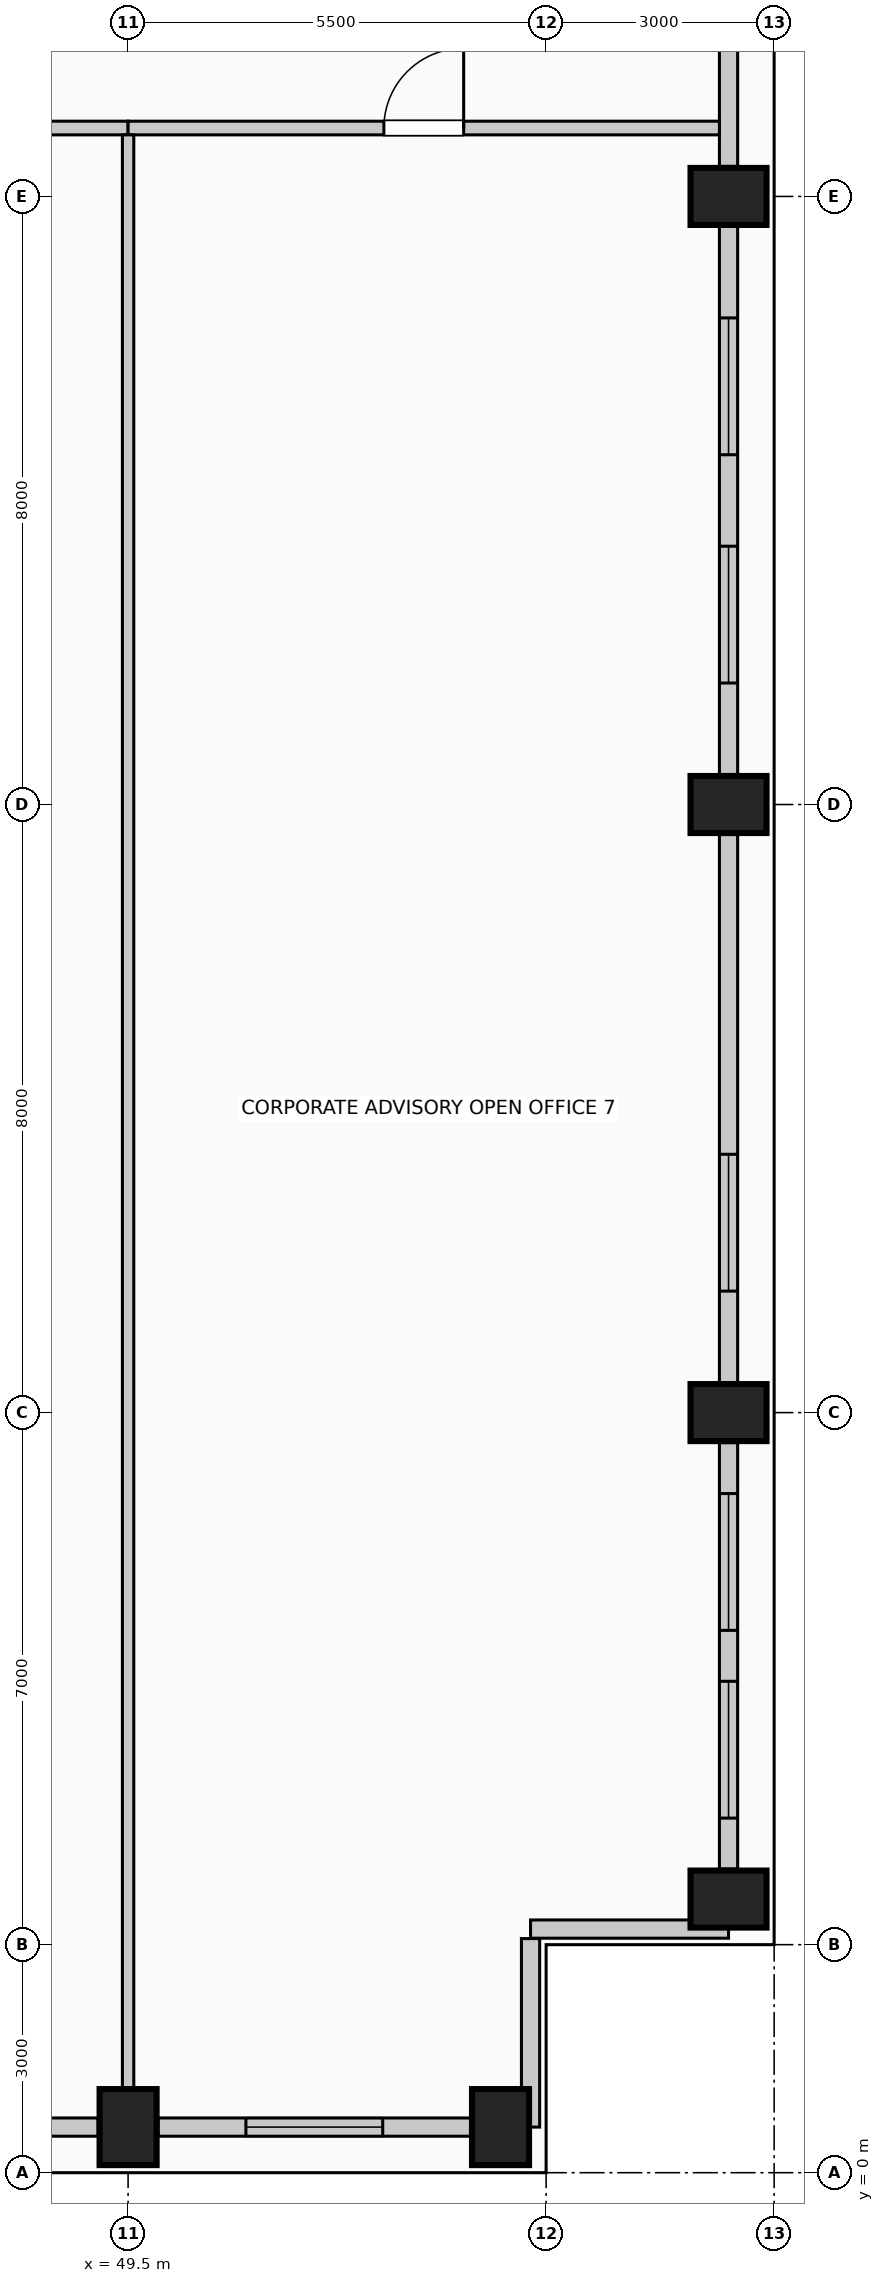
"""IFC4 building model, lengths in metres.
Left out: names, types, materials, properties, quantities, classifications, styles, units other than length and angle.
Written with IfcOpenShell. Run it as: python <this file> out.ifc"""

import sys

from ifc_helpers import new_model, si_unit, direction, frame, frame_2d, origin, origin_2d, place, context, subcontext, project, spatial, rectangle, extrude, element, fill, save


model = new_model("IFC4")
c1 = context("Model", 3, precision=1e-05, world=origin(), true_north=direction((0.0, 1.0)))
c2 = subcontext(c1, "Body", "Model", "MODEL_VIEW")
j1 = project(units=[si_unit("LENGTHUNIT", "METRE"), si_unit("PLANEANGLEUNIT", "RADIAN")], contexts=[c1])
p1 = place(None, origin())
s1 = spatial("IfcSite", under=j1, at=p1, CompositionType="ELEMENT")
p2 = place(p1, origin())
s2 = spatial("IfcBuilding", under=s1, at=p2, CompositionType="ELEMENT")
p3 = place(p2, frame((0.0, 0.0, 264.6)))
s3 = spatial("IfcBuildingStorey", under=s2, at=p3, CompositionType="ELEMENT", Elevation=264.6)
for number, where, z_axis, x_axis in (
    (1, (49.5, 0.6, 0.0), (0.0, 0.0, 1.0), (1.0, 0.0, 0.0)),
    (2, (54.4, 0.6, 0.0), (0.0, 0.0, 1.0), (1.0, 0.0, 0.0)),
    (3, (57.4, 3.6, 0.0), (0.0, 0.0, 1.0), (0.0, 1.0, 0.0)),
    (4, (57.4, 10.0, 0.0), (0.0, 0.0, 1.0), (0.0, 1.0, 0.0)),
    (5, (57.4, 18.0, 0.0), (0.0, 0.0, 1.0), (0.0, 1.0, 0.0)),
    (6, (57.4, 26.0, 0.0), (0.0, 0.0, 1.0), (0.0, 1.0, 0.0)),
):
    element("IfcColumn", number, at=place(p3, frame(where, z_axis=z_axis, x_axis=x_axis)), inside=s3, PredefinedType="COLUMN", context=c2, shape_type="SweptSolid", body=[
        extrude(rectangle(XDim=0.75, YDim=1.0, at=origin_2d()), origin(), (0.0, 0.0, 1.0), 4.0),
    ])
p4 = place(p3, frame((49.105, 0.6, 0.0), z_axis=(0.0, 0.0, 1.0), x_axis=(-1.0, 0.0, 0.0)))
e7 = element("IfcWall", 7, at=p4, inside=s3, PredefinedType="SOLIDWALL", context=c2, shape_type="SweptSolid", body=[
    extrude(rectangle(XDim=4.71, YDim=0.24, at=frame_2d((2.355, 0.0))), origin(), (0.0, 0.0, 1.0), 3.0),
])
p5 = place(p3, frame((54.005, 0.6, 0.0), z_axis=(0.0, 0.0, 1.0), x_axis=(-1.0, 0.0, 0.0)))
e8 = element("IfcWall", 8, at=p5, inside=s3, PredefinedType="SOLIDWALL", context=c2, shape_type="SweptSolid", body=[
    extrude(rectangle(XDim=4.11, YDim=0.24, at=frame_2d((2.055, 0.0))), origin(), (0.0, 0.0, 1.0), 3.0),
])
p6 = place(p5, frame((1.155, 0.0, 0.42)))
e9 = element("IfcOpeningElement", 9, at=p6, cuts=e8, PredefinedType="OPENING", context=c2, shape_type="SweptSolid", body=[
    extrude(rectangle(XDim=1.8, YDim=2.2, at=frame_2d((0.9, 1.1))), frame((0.0, 0.13, 0.0), z_axis=(0.0, -1.0, 0.0), x_axis=(1.0, 0.0, 0.0)), (0.0, 0.0, 1.0), 0.26),
])
p7 = place(p3, frame((57.4, 9.605, 0.0), z_axis=(0.0, 0.0, 1.0), x_axis=(0.0, -1.0, 0.0)))
e10 = element("IfcWall", 10, at=p7, inside=s3, PredefinedType="SOLIDWALL", context=c2, shape_type="SweptSolid", body=[
    extrude(rectangle(XDim=5.61, YDim=0.24, at=frame_2d((2.805, 0.0))), origin(), (0.0, 0.0, 1.0), 3.0),
])
p8 = place(p7, frame((0.67, 0.0, 0.42)))
e11 = element("IfcOpeningElement", 11, at=p8, cuts=e10, PredefinedType="OPENING", context=c2, shape_type="SweptSolid", body=[
    extrude(rectangle(XDim=1.8, YDim=2.2, at=frame_2d((0.9, 1.1))), frame((0.0, 0.13, 0.0), z_axis=(0.0, -1.0, 0.0), x_axis=(1.0, 0.0, 0.0)), (0.0, 0.0, 1.0), 0.26),
])
p9 = place(p7, frame((3.14, 0.0, 0.42)))
e12 = element("IfcOpeningElement", 12, at=p9, cuts=e10, PredefinedType="OPENING", context=c2, shape_type="SweptSolid", body=[
    extrude(rectangle(XDim=1.8, YDim=2.2, at=frame_2d((0.9, 1.1))), frame((0.0, 0.13, 0.0), z_axis=(0.0, -1.0, 0.0), x_axis=(1.0, 0.0, 0.0)), (0.0, 0.0, 1.0), 0.26),
])
p10 = place(p3, frame((57.4, 17.605, 0.0), z_axis=(0.0, 0.0, 1.0), x_axis=(0.0, -1.0, 0.0)))
e13 = element("IfcWall", 13, at=p10, inside=s3, PredefinedType="SOLIDWALL", context=c2, shape_type="SweptSolid", body=[
    extrude(rectangle(XDim=7.21, YDim=0.24, at=frame_2d((3.605, 0.0))), origin(), (0.0, 0.0, 1.0), 3.0),
])
p11 = place(p10, frame((4.207, 0.0, 0.42)))
e14 = element("IfcOpeningElement", 14, at=p11, cuts=e13, PredefinedType="OPENING", context=c2, shape_type="SweptSolid", body=[
    extrude(rectangle(XDim=1.8, YDim=2.2, at=frame_2d((0.9, 1.1))), frame((0.0, 0.13, 0.0), z_axis=(0.0, -1.0, 0.0), x_axis=(1.0, 0.0, 0.0)), (0.0, 0.0, 1.0), 0.26),
])
p12 = place(p3, frame((57.4, 25.605, 0.0), z_axis=(0.0, 0.0, 1.0), x_axis=(0.0, -1.0, 0.0)))
e15 = element("IfcWall", 15, at=p12, inside=s3, PredefinedType="SOLIDWALL", context=c2, shape_type="SweptSolid", body=[
    extrude(rectangle(XDim=7.21, YDim=0.24, at=frame_2d((3.605, 0.0))), origin(), (0.0, 0.0, 1.0), 3.0),
])
p13 = place(p12, frame((1.203, 0.0, 0.42)))
e16 = element("IfcOpeningElement", 16, at=p13, cuts=e15, PredefinedType="OPENING", context=c2, shape_type="SweptSolid", body=[
    extrude(rectangle(XDim=1.8, YDim=2.2, at=frame_2d((0.9, 1.1))), frame((0.0, 0.13, 0.0), z_axis=(0.0, -1.0, 0.0), x_axis=(1.0, 0.0, 0.0)), (0.0, 0.0, 1.0), 0.26),
])
p14 = place(p12, frame((4.207, 0.0, 0.42)))
e17 = element("IfcOpeningElement", 17, at=p14, cuts=e15, PredefinedType="OPENING", context=c2, shape_type="SweptSolid", body=[
    extrude(rectangle(XDim=1.8, YDim=2.2, at=frame_2d((0.9, 1.1))), frame((0.0, 0.13, 0.0), z_axis=(0.0, -1.0, 0.0), x_axis=(1.0, 0.0, 0.0)), (0.0, 0.0, 1.0), 0.26),
])
p15 = place(p3, frame((57.4, 33.605, 0.0), z_axis=(0.0, 0.0, 1.0), x_axis=(0.0, -1.0, 0.0)))
e18 = element("IfcWall", 18, at=p15, inside=s3, PredefinedType="SOLIDWALL", context=c2, shape_type="SweptSolid", body=[
    extrude(rectangle(XDim=7.21, YDim=0.24, at=frame_2d((3.605, 0.0))), origin(), (0.0, 0.0, 1.0), 3.0),
])
p16 = place(p3, frame((57.4, 3.205, 0.0), z_axis=(0.0, 0.0, 1.0), x_axis=(-1.0, 0.0, 0.0)))
e19 = element("IfcWall", 19, at=p16, inside=s3, PredefinedType="SOLIDWALL", context=c2, shape_type="SweptSolid", body=[
    extrude(rectangle(XDim=2.605, YDim=0.24, at=frame_2d((1.302, 0.0))), origin(), (0.0, 0.0, 1.0), 3.75),
])
p17 = place(p3, frame((54.795, 3.08, 0.0), z_axis=(0.0, 0.0, 1.0), x_axis=(0.0, -1.0, 0.0)))
e20 = element("IfcWall", 20, at=p17, inside=s3, PredefinedType="SOLIDWALL", context=c2, shape_type="SweptSolid", body=[
    extrude(rectangle(XDim=2.48, YDim=0.24, at=frame_2d((1.24, 0.0))), origin(), (0.0, 0.0, 1.0), 3.75),
])
p18 = place(p3, frame((39.52, 26.9, 0.0), z_axis=(0.0, 0.0, 1.0), x_axis=(1.0, 0.0, 0.0)))
e21 = element("IfcWall", 21, at=p18, inside=s3, PredefinedType="PARTITIONING", context=c2, shape_type="SweptSolid", body=[
    extrude(rectangle(XDim=9.98, YDim=0.18, at=frame_2d((4.99, 0.0))), origin(), (0.0, 0.0, 1.0), 3.75),
])
p19 = place(p18, frame((4.515, 0.0, 0.0)))
e22 = element("IfcOpeningElement", 22, at=p19, cuts=e21, PredefinedType="OPENING", context=c2, shape_type="SweptSolid", body=[
    extrude(rectangle(XDim=0.95, YDim=2.15, at=frame_2d((0.475, 1.075))), frame((0.0, 0.1, 0.0), z_axis=(0.0, -1.0, 0.0), x_axis=(1.0, 0.0, 0.0)), (0.0, 0.0, 1.0), 0.2),
])
p20 = place(p3, frame((49.5, 26.9, 0.0), z_axis=(0.0, 0.0, 1.0), x_axis=(1.0, 0.0, 0.0)))
e23 = element("IfcWall", 23, at=p20, inside=s3, PredefinedType="PARTITIONING", context=c2, shape_type="SweptSolid", body=[
    extrude(rectangle(XDim=7.78, YDim=0.18, at=frame_2d((3.89, 0.0))), origin(), (0.0, 0.0, 1.0), 3.75),
])
p21 = place(p20, frame((3.365, 0.0, 0.0)))
e24 = element("IfcOpeningElement", 24, at=p21, cuts=e23, PredefinedType="OPENING", context=c2, shape_type="SweptSolid", body=[
    extrude(rectangle(XDim=1.05, YDim=2.15, at=frame_2d((0.525, 1.075))), frame((0.0, 0.1, 0.0), z_axis=(0.0, -1.0, 0.0), x_axis=(1.0, 0.0, 0.0)), (0.0, 0.0, 1.0), 0.2),
])
p22 = place(p3, frame((49.5, 1.1, 0.0), z_axis=(0.0, 0.0, 1.0), x_axis=(0.0, 1.0, 0.0)))
e25 = element("IfcWall", 25, at=p22, inside=s3, PredefinedType="PARTITIONING", context=c2, shape_type="SweptSolid", body=[
    extrude(rectangle(XDim=25.71, YDim=0.15, at=frame_2d((12.855, 0.0))), origin(), (0.0, 0.0, 1.0), 3.75),
])
p23 = place(p6, origin())
e26 = element("IfcWindow", 26, at=p23, inside=s3, PartitioningType="SINGLE_PANEL", PredefinedType="WINDOW", context=c2, shape_type="SweptSolid", body=[
    extrude(rectangle(XDim=1.8, YDim=2.2, at=frame_2d((0.9, 1.1))), frame((0.0, 0.03, 0.0), z_axis=(0.0, -1.0, 0.0), x_axis=(1.0, 0.0, 0.0)), (0.0, 0.0, 1.0), 0.06),
])
fill(e9, e26)
p24 = place(p8, origin())
e27 = element("IfcWindow", 27, at=p24, inside=s3, PartitioningType="SINGLE_PANEL", PredefinedType="WINDOW", context=c2, shape_type="SweptSolid", body=[
    extrude(rectangle(XDim=1.8, YDim=2.2, at=frame_2d((0.9, 1.1))), frame((0.0, 0.03, 0.0), z_axis=(0.0, -1.0, 0.0), x_axis=(1.0, 0.0, 0.0)), (0.0, 0.0, 1.0), 0.06),
])
fill(e11, e27)
p25 = place(p9, origin())
e28 = element("IfcWindow", 28, at=p25, inside=s3, PartitioningType="SINGLE_PANEL", PredefinedType="WINDOW", context=c2, shape_type="SweptSolid", body=[
    extrude(rectangle(XDim=1.8, YDim=2.2, at=frame_2d((0.9, 1.1))), frame((0.0, 0.03, 0.0), z_axis=(0.0, -1.0, 0.0), x_axis=(1.0, 0.0, 0.0)), (0.0, 0.0, 1.0), 0.06),
])
fill(e12, e28)
p26 = place(p11, origin())
e29 = element("IfcWindow", 29, at=p26, inside=s3, PartitioningType="SINGLE_PANEL", PredefinedType="WINDOW", context=c2, shape_type="SweptSolid", body=[
    extrude(rectangle(XDim=1.8, YDim=2.2, at=frame_2d((0.9, 1.1))), frame((0.0, 0.03, 0.0), z_axis=(0.0, -1.0, 0.0), x_axis=(1.0, 0.0, 0.0)), (0.0, 0.0, 1.0), 0.06),
])
fill(e14, e29)
p27 = place(p13, origin())
e30 = element("IfcWindow", 30, at=p27, inside=s3, PartitioningType="SINGLE_PANEL", PredefinedType="WINDOW", context=c2, shape_type="SweptSolid", body=[
    extrude(rectangle(XDim=1.8, YDim=2.2, at=frame_2d((0.9, 1.1))), frame((0.0, 0.03, 0.0), z_axis=(0.0, -1.0, 0.0), x_axis=(1.0, 0.0, 0.0)), (0.0, 0.0, 1.0), 0.06),
])
fill(e16, e30)
p28 = place(p14, origin())
e31 = element("IfcWindow", 31, at=p28, inside=s3, PartitioningType="SINGLE_PANEL", PredefinedType="WINDOW", context=c2, shape_type="SweptSolid", body=[
    extrude(rectangle(XDim=1.8, YDim=2.2, at=frame_2d((0.9, 1.1))), frame((0.0, 0.03, 0.0), z_axis=(0.0, -1.0, 0.0), x_axis=(1.0, 0.0, 0.0)), (0.0, 0.0, 1.0), 0.06),
])
fill(e17, e31)
p29 = place(p21, origin())
e32 = element("IfcDoor", 32, at=p29, inside=s3, OperationType="SINGLE_SWING_RIGHT", PredefinedType="DOOR", context=c2, shape_type="SweptSolid", body=[
    extrude(rectangle(XDim=1.05, YDim=2.15, at=frame_2d((0.525, 1.075))), frame((0.0, 0.025, 0.0), z_axis=(0.0, -1.0, 0.0), x_axis=(1.0, 0.0, 0.0)), (0.0, 0.0, 1.0), 0.05),
])
fill(e24, e32)
save(model, sys.argv[1])
